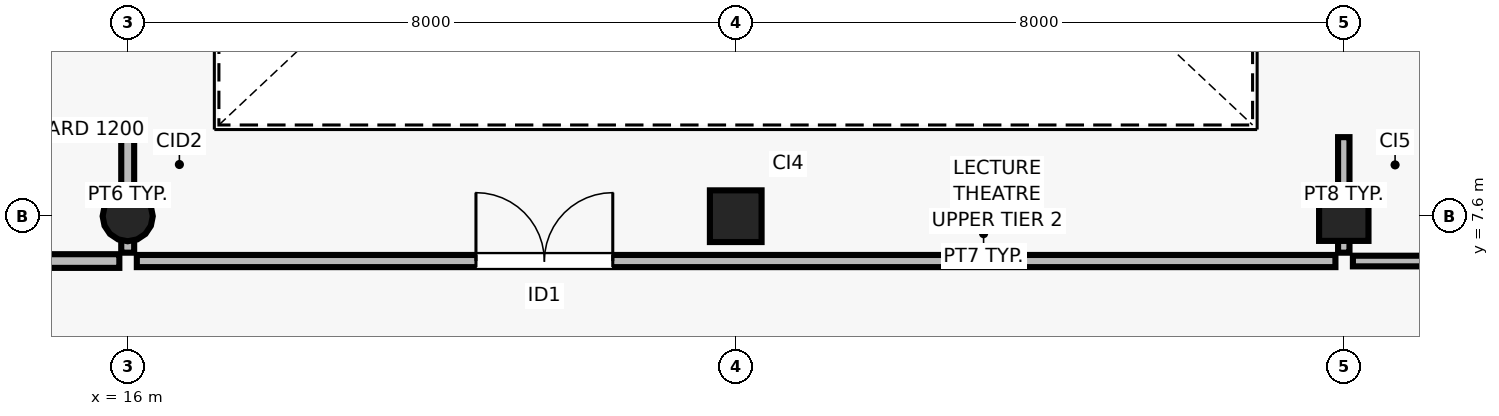
"""IFC4 building model, lengths in metres.
Left out: names, types, materials, properties, quantities, classifications, styles, units other than length and angle.
Written with IfcOpenShell. Run it as: python <this file> out.ifc"""

import sys

from ifc_helpers import new_model, si_unit, direction, frame, frame_2d, origin, origin_2d, place, context, subcontext, project, spatial, rectangle, circle, extrude, element, fill, save


model = new_model("IFC4")
c1 = context("Model", 3, precision=1e-05, world=origin(), true_north=direction((0.0, 1.0)))
c2 = subcontext(c1, "Body", "Model", "MODEL_VIEW")
j1 = project(units=[si_unit("LENGTHUNIT", "METRE"), si_unit("PLANEANGLEUNIT", "RADIAN")], contexts=[c1])
p1 = place(None, origin())
s1 = spatial("IfcSite", under=j1, at=p1, CompositionType="ELEMENT")
p2 = place(p1, origin())
s2 = spatial("IfcBuilding", under=s1, at=p2, CompositionType="ELEMENT")
p3 = place(p2, frame((0.0, 0.0, 4.5)))
s3 = spatial("IfcBuildingStorey", under=s2, at=p3, CompositionType="ELEMENT", Elevation=4.5)
p4 = place(p3, frame((16.0, 7.6, 0.0), z_axis=(0.0, 0.0, 1.0), x_axis=(1.0, 0.0, 0.0)))
e1 = element("IfcColumn", 1, at=p4, inside=s3, PredefinedType="COLUMN", context=c2, shape_type="SweptSolid", body=[
    extrude(circle(Radius=0.33, at=origin_2d()), origin(), (0.0, 0.0, 1.0), 4.5),
])
p5 = place(p3, frame((24.0, 7.6, 0.0), z_axis=(0.0, 0.0, 1.0), x_axis=(1.0, 0.0, 0.0)))
e2 = element("IfcColumn", 2, at=p5, inside=s3, PredefinedType="COLUMN", context=c2, shape_type="SweptSolid", body=[
    extrude(rectangle(XDim=0.68, YDim=0.68, at=origin_2d()), origin(), (0.0, 0.0, 1.0), 4.5),
])
p6 = place(p3, frame((32.0, 7.6, 0.0), z_axis=(0.0, 0.0, 1.0), x_axis=(1.0, 0.0, 0.0)))
e3 = element("IfcColumn", 3, at=p6, inside=s3, PredefinedType="COLUMN", context=c2, shape_type="SweptSolid", body=[
    extrude(rectangle(XDim=0.65, YDim=0.65, at=origin_2d()), origin(), (0.0, 0.0, 1.0), 4.5),
])
p7 = place(p3, frame((0.11, 7.01, 0.0), z_axis=(0.0, 0.0, 1.0), x_axis=(1.0, 0.0, 0.0)))
e4 = element("IfcWall", 4, at=p7, inside=s3, PredefinedType="PARTITIONING", context=c2, shape_type="SweptSolid", body=[
    extrude(rectangle(XDim=15.78, YDim=0.18, at=frame_2d((7.89, 0.0))), origin(), (0.0, 0.0, 1.0), 4.2),
])
p8 = place(p7, frame((4.515, 0.0, 0.0)))
e5 = element("IfcOpeningElement", 5, at=p8, cuts=e4, PredefinedType="OPENING", context=c2, shape_type="SweptSolid", body=[
    extrude(rectangle(XDim=1.7, YDim=2.3, at=frame_2d((0.85, 1.15))), frame((0.0, 0.1, 0.0), z_axis=(0.0, -1.0, 0.0), x_axis=(1.0, 0.0, 0.0)), (0.0, 0.0, 1.0), 0.2),
])
p9 = place(p3, frame((16.0, 7.12, 0.0), z_axis=(0.0, 0.0, 1.0), x_axis=(0.0, 1.0, 0.0)))
e6 = element("IfcWall", 6, at=p9, inside=s3, PredefinedType="PARTITIONING", context=c2, shape_type="SweptSolid", body=[
    extrude(rectangle(XDim=1.52, YDim=0.17, at=frame_2d((0.76, 0.0))), origin(), (0.0, 0.0, 1.0), 3.64),
])
p10 = place(p3, frame((16.12, 7.01, 0.0), z_axis=(0.0, 0.0, 1.0), x_axis=(1.0, 0.0, 0.0)))
e7 = element("IfcWall", 7, at=p10, inside=s3, PredefinedType="PARTITIONING", context=c2, shape_type="SweptSolid", body=[
    extrude(rectangle(XDim=15.77, YDim=0.16, at=frame_2d((7.885, 0.0))), origin(), (0.0, 0.0, 1.0), 4.2),
])
p11 = place(p10, frame((4.462, 0.0, 0.0)))
e8 = element("IfcOpeningElement", 8, at=p11, cuts=e7, PredefinedType="OPENING", context=c2, shape_type="SweptSolid", body=[
    extrude(rectangle(XDim=1.8, YDim=2.3, at=frame_2d((0.9, 1.15))), frame((0.0, 0.09, 0.0), z_axis=(0.0, -1.0, 0.0), x_axis=(1.0, 0.0, 0.0)), (0.0, 0.0, 1.0), 0.18),
])
p12 = place(p3, frame((32.0, 7.12, 0.0), z_axis=(0.0, 0.0, 1.0), x_axis=(0.0, 1.0, 0.0)))
e9 = element("IfcWall", 9, at=p12, inside=s3, PredefinedType="PARTITIONING", context=c2, shape_type="SweptSolid", body=[
    extrude(rectangle(XDim=1.52, YDim=0.15, at=frame_2d((0.76, 0.0))), origin(), (0.0, 0.0, 1.0), 3.64),
])
p13 = place(p3, frame((32.12, 7.01, 0.0), z_axis=(0.0, 0.0, 1.0), x_axis=(1.0, 0.0, 0.0)))
e10 = element("IfcWall", 10, at=p13, inside=s3, PredefinedType="PARTITIONING", context=c2, shape_type="SweptSolid", body=[
    extrude(rectangle(XDim=15.77, YDim=0.14, at=frame_2d((7.885, 0.0))), origin(), (0.0, 0.0, 1.0), 4.2),
])
p14 = place(p13, frame((4.512, 0.0, 0.0)))
e11 = element("IfcOpeningElement", 11, at=p14, cuts=e10, PredefinedType="OPENING", context=c2, shape_type="SweptSolid", body=[
    extrude(rectangle(XDim=1.7, YDim=2.3, at=frame_2d((0.85, 1.15))), frame((0.0, 0.08, 0.0), z_axis=(0.0, -1.0, 0.0), x_axis=(1.0, 0.0, 0.0)), (0.0, 0.0, 1.0), 0.16),
])
p15 = place(p11, origin())
e12 = element("IfcDoor", 12, at=p15, inside=s3, OperationType="DOUBLE_DOOR_SINGLE_SWING", PredefinedType="DOOR", context=c2, shape_type="SweptSolid", body=[
    extrude(rectangle(XDim=1.8, YDim=2.3, at=frame_2d((0.9, 1.15))), frame((0.0, 0.025, 0.0), z_axis=(0.0, -1.0, 0.0), x_axis=(1.0, 0.0, 0.0)), (0.0, 0.0, 1.0), 0.05),
])
fill(e8, e12)
save(model, sys.argv[1])
